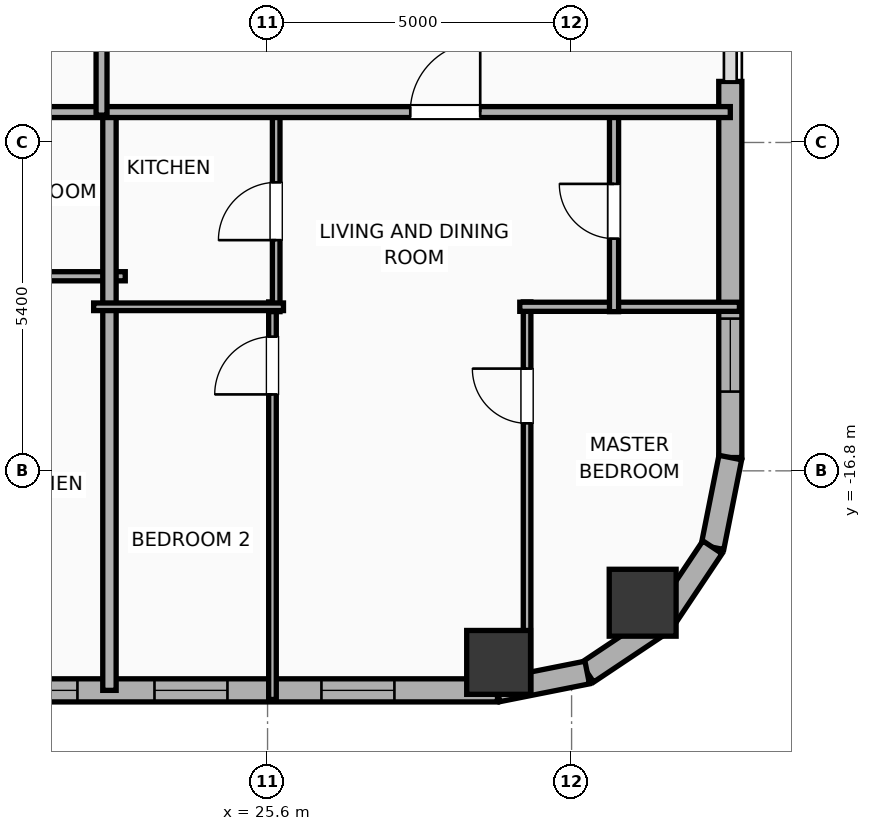
"""IFC4 building model, lengths in metres.
Left out: names, types, materials, properties, quantities, classifications, styles, units other than length and angle.
Written with IfcOpenShell. Run it as: python <this file> out.ifc"""

import sys

from ifc_helpers import new_model, si_unit, direction, frame, frame_2d, origin, origin_2d, place, context, subcontext, project, spatial, rectangle, hollow_rectangle, hollow_circle, extrude, element, fill, save


model = new_model("IFC4")
c1 = context("Model", 3, precision=1e-05, world=origin(), true_north=direction((0.0, 1.0)))
c2 = subcontext(c1, "Body", "Model", "MODEL_VIEW")
j1 = project(units=[si_unit("LENGTHUNIT", "METRE"), si_unit("PLANEANGLEUNIT", "RADIAN")], contexts=[c1])
p1 = place(None, origin())
s1 = spatial("IfcSite", under=j1, at=p1, CompositionType="ELEMENT")
p2 = place(p1, origin())
s2 = spatial("IfcBuilding", under=s1, at=p2, CompositionType="ELEMENT")
p3 = place(p2, frame((0.0, 0.0, 89.7)))
s3 = spatial("IfcBuildingStorey", under=s2, at=p3, CompositionType="ELEMENT", Elevation=89.7)
p4 = place(p3, frame((29.4, -19.95, 0.0), z_axis=(0.0, 0.0, 1.0), x_axis=(1.0, 0.0, 0.0)))
e1 = element("IfcColumn", 1, at=p4, inside=s3, PredefinedType="COLUMN", context=c2, shape_type="SweptSolid", body=[
    extrude(hollow_rectangle(XDim=1.05, YDim=1.05, WallThickness=0.036, at=origin_2d()), origin(), (0.0, 0.0, 1.0), 3.9),
])
p5 = place(p3, frame((31.769, -18.969, 0.0), z_axis=(0.0, 0.0, 1.0), x_axis=(1.0, 0.0, 0.0)))
e2 = element("IfcColumn", 2, at=p5, inside=s3, PredefinedType="COLUMN", context=c2, shape_type="SweptSolid", body=[
    extrude(hollow_circle(Radius=0.55, WallThickness=0.036, at=origin_2d()), origin(), (0.0, 0.0, 1.0), 3.9),
])
p6 = place(p3, frame((29.381, -20.41, 0.0), z_axis=(0.0, 0.0, 1.0), x_axis=(-1.0, 0.0, 0.0)))
e3 = element("IfcWall", 3, at=p6, inside=s3, PredefinedType="ELEMENTEDWALL", context=c2, shape_type="SweptSolid", body=[
    extrude(rectangle(XDim=54.763, YDim=0.38, at=frame_2d((27.381, 0.0))), origin(), (0.0, 0.0, 1.0), 2.54),
])
p7 = place(p6, frame((48.367, 0.0, 0.75)))
e4 = element("IfcOpeningElement", 4, at=p7, cuts=e3, PredefinedType="OPENING", context=c2, shape_type="SweptSolid", body=[
    extrude(rectangle(XDim=2.4, YDim=1.63, at=frame_2d((1.2, 0.815))), frame((0.0, 0.2, 0.0), z_axis=(0.0, -1.0, 0.0), x_axis=(1.0, 0.0, 0.0)), (0.0, 0.0, 1.0), 0.4),
])
p8 = place(p6, frame((52.081, 0.0, 0.75)))
e5 = element("IfcOpeningElement", 5, at=p8, cuts=e3, PredefinedType="OPENING", context=c2, shape_type="SweptSolid", body=[
    extrude(rectangle(XDim=1.2, YDim=1.63, at=frame_2d((0.6, 0.815))), frame((0.0, 0.2, 0.0), z_axis=(0.0, -1.0, 0.0), x_axis=(1.0, 0.0, 0.0)), (0.0, 0.0, 1.0), 0.4),
])
p9 = place(p6, frame((45.486, 0.0, 0.75)))
e6 = element("IfcOpeningElement", 6, at=p9, cuts=e3, PredefinedType="OPENING", context=c2, shape_type="SweptSolid", body=[
    extrude(rectangle(XDim=1.2, YDim=1.63, at=frame_2d((0.6, 0.815))), frame((0.0, 0.2, 0.0), z_axis=(0.0, -1.0, 0.0), x_axis=(1.0, 0.0, 0.0)), (0.0, 0.0, 1.0), 0.4),
])
p10 = place(p6, frame((40.531, 0.0, 0.75)))
e7 = element("IfcOpeningElement", 7, at=p10, cuts=e3, PredefinedType="OPENING", context=c2, shape_type="SweptSolid", body=[
    extrude(rectangle(XDim=1.2, YDim=1.63, at=frame_2d((0.6, 0.815))), frame((0.0, 0.2, 0.0), z_axis=(0.0, -1.0, 0.0), x_axis=(1.0, 0.0, 0.0)), (0.0, 0.0, 1.0), 0.4),
])
p11 = place(p6, frame((33.686, 0.0, 0.75)))
e8 = element("IfcOpeningElement", 8, at=p11, cuts=e3, PredefinedType="OPENING", context=c2, shape_type="SweptSolid", body=[
    extrude(rectangle(XDim=1.2, YDim=1.63, at=frame_2d((0.6, 0.815))), frame((0.0, 0.2, 0.0), z_axis=(0.0, -1.0, 0.0), x_axis=(1.0, 0.0, 0.0)), (0.0, 0.0, 1.0), 0.4),
])
p12 = place(p6, frame((35.976, 0.0, 0.75)))
e9 = element("IfcOpeningElement", 9, at=p12, cuts=e3, PredefinedType="OPENING", context=c2, shape_type="SweptSolid", body=[
    extrude(rectangle(XDim=1.2, YDim=1.63, at=frame_2d((0.6, 0.815))), frame((0.0, 0.2, 0.0), z_axis=(0.0, -1.0, 0.0), x_axis=(1.0, 0.0, 0.0)), (0.0, 0.0, 1.0), 0.4),
])
p13 = place(p6, frame((28.805, 0.0, 0.75)))
e10 = element("IfcOpeningElement", 10, at=p13, cuts=e3, PredefinedType="OPENING", context=c2, shape_type="SweptSolid", body=[
    extrude(rectangle(XDim=1.2, YDim=1.63, at=frame_2d((0.6, 0.815))), frame((0.0, 0.2, 0.0), z_axis=(0.0, -1.0, 0.0), x_axis=(1.0, 0.0, 0.0)), (0.0, 0.0, 1.0), 0.4),
])
p14 = place(p6, frame((25.555, 0.0, 0.75)))
e11 = element("IfcOpeningElement", 11, at=p14, cuts=e3, PredefinedType="OPENING", context=c2, shape_type="SweptSolid", body=[
    extrude(rectangle(XDim=1.2, YDim=1.63, at=frame_2d((0.6, 0.815))), frame((0.0, 0.2, 0.0), z_axis=(0.0, -1.0, 0.0), x_axis=(1.0, 0.0, 0.0)), (0.0, 0.0, 1.0), 0.4),
])
p15 = place(p6, frame((19.951, 0.0, 0.75)))
e12 = element("IfcOpeningElement", 12, at=p15, cuts=e3, PredefinedType="OPENING", context=c2, shape_type="SweptSolid", body=[
    extrude(rectangle(XDim=1.2, YDim=1.63, at=frame_2d((0.6, 0.815))), frame((0.0, 0.2, 0.0), z_axis=(0.0, -1.0, 0.0), x_axis=(1.0, 0.0, 0.0)), (0.0, 0.0, 1.0), 0.4),
])
p16 = place(p6, frame((16.008, 0.0, 0.75)))
e13 = element("IfcOpeningElement", 13, at=p16, cuts=e3, PredefinedType="OPENING", context=c2, shape_type="SweptSolid", body=[
    extrude(rectangle(XDim=1.2, YDim=1.63, at=frame_2d((0.6, 0.815))), frame((0.0, 0.2, 0.0), z_axis=(0.0, -1.0, 0.0), x_axis=(1.0, 0.0, 0.0)), (0.0, 0.0, 1.0), 0.4),
])
p17 = place(p6, frame((13.008, 0.0, 0.75)))
e14 = element("IfcOpeningElement", 14, at=p17, cuts=e3, PredefinedType="OPENING", context=c2, shape_type="SweptSolid", body=[
    extrude(rectangle(XDim=1.2, YDim=1.63, at=frame_2d((0.6, 0.815))), frame((0.0, 0.2, 0.0), z_axis=(0.0, -1.0, 0.0), x_axis=(1.0, 0.0, 0.0)), (0.0, 0.0, 1.0), 0.4),
])
p18 = place(p6, frame((8.948, 0.0, 0.75)))
e15 = element("IfcOpeningElement", 15, at=p18, cuts=e3, PredefinedType="OPENING", context=c2, shape_type="SweptSolid", body=[
    extrude(rectangle(XDim=1.2, YDim=1.63, at=frame_2d((0.6, 0.815))), frame((0.0, 0.2, 0.0), z_axis=(0.0, -1.0, 0.0), x_axis=(1.0, 0.0, 0.0)), (0.0, 0.0, 1.0), 0.4),
])
p19 = place(p6, frame((6.908, 0.0, 0.75)))
e16 = element("IfcOpeningElement", 16, at=p19, cuts=e3, PredefinedType="OPENING", context=c2, shape_type="SweptSolid", body=[
    extrude(rectangle(XDim=1.2, YDim=1.63, at=frame_2d((0.6, 0.815))), frame((0.0, 0.2, 0.0), z_axis=(0.0, -1.0, 0.0), x_axis=(1.0, 0.0, 0.0)), (0.0, 0.0, 1.0), 0.4),
])
p20 = place(p6, frame((1.695, 0.0, 0.75)))
e17 = element("IfcOpeningElement", 17, at=p20, cuts=e3, PredefinedType="OPENING", context=c2, shape_type="SweptSolid", body=[
    extrude(rectangle(XDim=1.2, YDim=1.63, at=frame_2d((0.6, 0.815))), frame((0.0, 0.2, 0.0), z_axis=(0.0, -1.0, 0.0), x_axis=(1.0, 0.0, 0.0)), (0.0, 0.0, 1.0), 0.4),
])
p21 = place(p6, frame((4.441, 0.0, 0.75)))
e18 = element("IfcOpeningElement", 18, at=p21, cuts=e3, PredefinedType="OPENING", context=c2, shape_type="SweptSolid", body=[
    extrude(rectangle(XDim=1.2, YDim=1.63, at=frame_2d((0.6, 0.815))), frame((0.0, 0.2, 0.0), z_axis=(0.0, -1.0, 0.0), x_axis=(1.0, 0.0, 0.0)), (0.0, 0.0, 1.0), 0.4),
])
p22 = place(p3, frame((33.21, -10.396, 0.0), z_axis=(0.0, 0.0, 1.0), x_axis=(0.0, -1.0, 0.0)))
e19 = element("IfcWall", 19, at=p22, inside=s3, PredefinedType="ELEMENTEDWALL", context=c2, shape_type="SweptSolid", body=[
    extrude(rectangle(XDim=6.185, YDim=0.38, at=frame_2d((3.093, 0.0))), origin(), (0.0, 0.0, 1.0), 2.54),
])
p23 = place(p22, frame((3.901, 0.0, 0.75)))
e20 = element("IfcOpeningElement", 20, at=p23, cuts=e19, PredefinedType="OPENING", context=c2, shape_type="SweptSolid", body=[
    extrude(rectangle(XDim=1.2, YDim=1.63, at=frame_2d((0.6, 0.815))), frame((0.0, 0.2, 0.0), z_axis=(0.0, -1.0, 0.0), x_axis=(1.0, 0.0, 0.0)), (0.0, 0.0, 1.0), 0.4),
])
p24 = place(p3, frame((33.21, -16.581, 0.0), z_axis=(0.0, 0.0, 1.0), x_axis=(-0.195086038585, -0.980786132421, 0.0)))
e21 = element("IfcWall", 21, at=p24, inside=s3, PredefinedType="ELEMENTEDWALL", context=c2, shape_type="SweptSolid", body=[
    extrude(rectangle(XDim=1.504, YDim=0.38, at=frame_2d((0.752, 0.0))), origin(), (0.0, 0.0, 1.0), 3.65),
])
p25 = place(p3, frame((32.917, -18.057, 0.0), z_axis=(0.0, 0.0, 1.0), x_axis=(-0.555610286119, -0.831442848281, 0.0)))
e22 = element("IfcWall", 22, at=p25, inside=s3, PredefinedType="ELEMENTEDWALL", context=c2, shape_type="SweptSolid", body=[
    extrude(rectangle(XDim=1.485, YDim=0.38, at=frame_2d((0.743, 0.0))), origin(), (0.0, 0.0, 1.0), 3.65),
])
p26 = place(p3, frame((32.091, -19.292, 0.0), z_axis=(0.0, 0.0, 1.0), x_axis=(-0.831468045563, -0.555572577804, 0.0)))
e23 = element("IfcWall", 23, at=p26, inside=s3, PredefinedType="ELEMENTEDWALL", context=c2, shape_type="SweptSolid", body=[
    extrude(rectangle(XDim=1.485, YDim=0.38, at=frame_2d((0.742, 0.0))), origin(), (0.0, 0.0, 1.0), 2.54),
])
p27 = place(p3, frame((30.857, -20.116, 0.0), z_axis=(0.0, 0.0, 1.0), x_axis=(-0.980786132421, -0.195086038585, 0.0)))
e24 = element("IfcWall", 24, at=p27, inside=s3, PredefinedType="ELEMENTEDWALL", context=c2, shape_type="SweptSolid", body=[
    extrude(rectangle(XDim=1.504, YDim=0.38, at=frame_2d((0.752, 0.0))), origin(), (0.0, 0.0, 1.0), 2.54),
])
p28 = place(p3, frame((20.667, -13.6, 0.0), z_axis=(0.0, 0.0, 1.0), x_axis=(1.0, 0.0, 0.0)))
e25 = element("IfcWall", 25, at=p28, inside=s3, PredefinedType="PLUMBINGWALL", context=c2, shape_type="SweptSolid", body=[
    extrude(rectangle(XDim=2.593, YDim=0.15, at=frame_2d((1.296, 0.0))), origin(), (0.0, 0.0, 1.0), 3.65),
])
p29 = place(p3, frame((23.0, -20.41, 0.0), z_axis=(0.0, 0.0, 1.0), x_axis=(0.0, 1.0, 0.0)))
e26 = element("IfcWall", 26, at=p29, inside=s3, PredefinedType="PARTITIONING", context=c2, shape_type="SweptSolid", body=[
    extrude(rectangle(XDim=9.59, YDim=0.22, at=frame_2d((4.795, 0.0))), origin(), (0.0, 0.0, 1.0), 3.65),
])
p30 = place(p3, frame((25.681, -20.56, 0.0), z_axis=(0.0, 0.0, 1.0), x_axis=(0.0, 1.0, 0.0)))
e27 = element("IfcWall", 27, at=p30, inside=s3, PredefinedType="PARTITIONING", context=c2, shape_type="SweptSolid", body=[
    extrude(rectangle(XDim=6.538, YDim=0.125, at=frame_2d((3.269, 0.0))), origin(), (0.0, 0.0, 1.0), 3.65),
])
p31 = place(p30, frame((5.017, 0.0, 0.0)))
e28 = element("IfcOpeningElement", 28, at=p31, cuts=e27, PredefinedType="OPENING", context=c2, shape_type="SweptSolid", body=[
    extrude(rectangle(XDim=0.95, YDim=2.05, at=frame_2d((0.475, 1.025))), frame((0.0, 0.073, 0.0), z_axis=(0.0, -1.0, 0.0), x_axis=(1.0, 0.0, 0.0)), (0.0, 0.0, 1.0), 0.145),
])
p32 = place(p3, frame((29.868, -20.466, 0.0), z_axis=(0.0, 0.0, 1.0), x_axis=(0.0, 1.0, 0.0)))
e29 = element("IfcWall", 29, at=p32, inside=s3, PredefinedType="PARTITIONING", context=c2, shape_type="SweptSolid", body=[
    extrude(rectangle(XDim=6.444, YDim=0.125, at=frame_2d((3.222, 0.0))), origin(), (0.0, 0.0, 1.0), 3.65),
])
p33 = place(p32, frame((4.448, 0.0, 0.0)))
e30 = element("IfcOpeningElement", 30, at=p33, cuts=e29, PredefinedType="OPENING", context=c2, shape_type="SweptSolid", body=[
    extrude(rectangle(XDim=0.9, YDim=2.05, at=frame_2d((0.45, 1.025))), frame((0.0, 0.073, 0.0), z_axis=(0.0, -1.0, 0.0), x_axis=(1.0, 0.0, 0.0)), (0.0, 0.0, 1.0), 0.145),
])
p34 = place(p3, frame((29.748, -14.102, 0.0), z_axis=(0.0, 0.0, 1.0), x_axis=(1.0, 0.0, 0.0)))
e31 = element("IfcWall", 31, at=p34, inside=s3, PredefinedType="PLUMBINGWALL", context=c2, shape_type="SweptSolid", body=[
    extrude(rectangle(XDim=3.612, YDim=0.15, at=frame_2d((1.806, 0.0))), origin(), (0.0, 0.0, 1.0), 3.65),
])
p35 = place(p3, frame((25.742, -14.182, 0.0), z_axis=(0.0, 0.0, 1.0), x_axis=(0.0, 1.0, 0.0)))
e32 = element("IfcWall", 32, at=p35, inside=s3, PredefinedType="PARTITIONING", context=c2, shape_type="SweptSolid", body=[
    extrude(rectangle(XDim=3.302, YDim=0.125, at=frame_2d((1.651, 0.0))), origin(), (0.0, 0.0, 1.0), 3.65),
])
p36 = place(p35, frame((1.176, 0.0, 0.0)))
e33 = element("IfcOpeningElement", 33, at=p36, cuts=e32, PredefinedType="OPENING", context=c2, shape_type="SweptSolid", body=[
    extrude(rectangle(XDim=0.95, YDim=2.05, at=frame_2d((0.475, 1.025))), frame((0.0, 0.073, 0.0), z_axis=(0.0, -1.0, 0.0), x_axis=(1.0, 0.0, 0.0)), (0.0, 0.0, 1.0), 0.145),
])
p37 = place(p3, frame((22.74, -14.102, 0.0), z_axis=(0.0, 0.0, 1.0), x_axis=(1.0, 0.0, 0.0)))
e34 = element("IfcWall", 34, at=p37, inside=s3, PredefinedType="PARTITIONING", context=c2, shape_type="SweptSolid", body=[
    extrude(rectangle(XDim=3.122, YDim=0.125, at=frame_2d((1.561, 0.0))), origin(), (0.0, 0.0, 1.0), 3.65),
])
p38 = place(p3, frame((31.298, -14.182, 0.0), z_axis=(0.0, 0.0, 1.0), x_axis=(0.0, 1.0, 0.0)))
e35 = element("IfcWall", 35, at=p38, inside=s3, PredefinedType="PLUMBINGWALL", context=c2, shape_type="SweptSolid", body=[
    extrude(rectangle(XDim=3.302, YDim=0.15, at=frame_2d((1.651, 0.0))), origin(), (0.0, 0.0, 1.0), 3.65),
])
p39 = place(p38, frame((1.201, 0.0, 0.0)))
e36 = element("IfcOpeningElement", 36, at=p39, cuts=e35, PredefinedType="OPENING", context=c2, shape_type="SweptSolid", body=[
    extrude(rectangle(XDim=0.9, YDim=2.05, at=frame_2d((0.45, 1.025))), frame((0.0, 0.085, 0.0), z_axis=(0.0, -1.0, 0.0), x_axis=(1.0, 0.0, 0.0)), (0.0, 0.0, 1.0), 0.17),
])
p40 = place(p3, frame((-29.21, -10.9, 0.0), z_axis=(0.0, 0.0, 1.0), x_axis=(1.0, 0.0, 0.0)))
e37 = element("IfcWall", 37, at=p40, inside=s3, PredefinedType="PARTITIONING", context=c2, shape_type="SweptSolid", body=[
    extrude(rectangle(XDim=62.42, YDim=0.18, at=frame_2d((31.21, 0.0))), origin(), (0.0, 0.0, 1.0), 3.65),
])
p41 = place(p40, frame((3.108, 0.0, 0.0)))
e38 = element("IfcOpeningElement", 38, at=p41, cuts=e37, PredefinedType="OPENING", context=c2, shape_type="SweptSolid", body=[
    extrude(rectangle(XDim=1.15, YDim=2.05, at=frame_2d((0.575, 1.025))), frame((0.0, 0.1, 0.0), z_axis=(0.0, -1.0, 0.0), x_axis=(1.0, 0.0, 0.0)), (0.0, 0.0, 1.0), 0.2),
])
p42 = place(p40, frame((10.242, 0.0, 0.0)))
e39 = element("IfcOpeningElement", 39, at=p42, cuts=e37, PredefinedType="OPENING", context=c2, shape_type="SweptSolid", body=[
    extrude(rectangle(XDim=1.15, YDim=2.05, at=frame_2d((0.575, 1.025))), frame((0.0, 0.1, 0.0), z_axis=(0.0, -1.0, 0.0), x_axis=(1.0, 0.0, 0.0)), (0.0, 0.0, 1.0), 0.2),
])
p43 = place(p40, frame((17.14, 0.0, 0.0)))
e40 = element("IfcOpeningElement", 40, at=p43, cuts=e37, PredefinedType="OPENING", context=c2, shape_type="SweptSolid", body=[
    extrude(rectangle(XDim=0.9, YDim=2.05, at=frame_2d((0.45, 1.025))), frame((0.0, 0.1, 0.0), z_axis=(0.0, -1.0, 0.0), x_axis=(1.0, 0.0, 0.0)), (0.0, 0.0, 1.0), 0.2),
])
p44 = place(p40, frame((24.661, 0.0, 0.0)))
e41 = element("IfcOpeningElement", 41, at=p44, cuts=e37, PredefinedType="OPENING", context=c2, shape_type="SweptSolid", body=[
    extrude(rectangle(XDim=1.15, YDim=2.05, at=frame_2d((0.575, 1.025))), frame((0.0, 0.1, 0.0), z_axis=(0.0, -1.0, 0.0), x_axis=(1.0, 0.0, 0.0)), (0.0, 0.0, 1.0), 0.2),
])
p45 = place(p40, frame((28.644, 0.0, 0.0)))
e42 = element("IfcOpeningElement", 42, at=p45, cuts=e37, PredefinedType="OPENING", context=c2, shape_type="SweptSolid", body=[
    extrude(rectangle(XDim=1.15, YDim=2.05, at=frame_2d((0.575, 1.025))), frame((0.0, 0.1, 0.0), z_axis=(0.0, -1.0, 0.0), x_axis=(1.0, 0.0, 0.0)), (0.0, 0.0, 1.0), 0.2),
])
p46 = place(p40, frame((36.64, 0.0, 0.0)))
e43 = element("IfcOpeningElement", 43, at=p46, cuts=e37, PredefinedType="OPENING", context=c2, shape_type="SweptSolid", body=[
    extrude(rectangle(XDim=0.9, YDim=2.05, at=frame_2d((0.45, 1.025))), frame((0.0, 0.1, 0.0), z_axis=(0.0, -1.0, 0.0), x_axis=(1.0, 0.0, 0.0)), (0.0, 0.0, 1.0), 0.2),
])
p47 = place(p40, frame((41.44, 0.0, 0.0)))
e44 = element("IfcOpeningElement", 44, at=p47, cuts=e37, PredefinedType="OPENING", context=c2, shape_type="SweptSolid", body=[
    extrude(rectangle(XDim=1.15, YDim=2.05, at=frame_2d((0.575, 1.025))), frame((0.0, 0.1, 0.0), z_axis=(0.0, -1.0, 0.0), x_axis=(1.0, 0.0, 0.0)), (0.0, 0.0, 1.0), 0.2),
])
p48 = place(p40, frame((47.538, 0.0, 0.0)))
e45 = element("IfcOpeningElement", 45, at=p48, cuts=e37, PredefinedType="OPENING", context=c2, shape_type="SweptSolid", body=[
    extrude(rectangle(XDim=1.15, YDim=2.05, at=frame_2d((0.575, 1.025))), frame((0.0, 0.1, 0.0), z_axis=(0.0, -1.0, 0.0), x_axis=(1.0, 0.0, 0.0)), (0.0, 0.0, 1.0), 0.2),
])
p49 = place(p40, frame((57.157, 0.0, 0.0)))
e46 = element("IfcOpeningElement", 46, at=p49, cuts=e37, PredefinedType="OPENING", context=c2, shape_type="SweptSolid", body=[
    extrude(rectangle(XDim=1.15, YDim=2.05, at=frame_2d((0.575, 1.025))), frame((0.0, 0.1, 0.0), z_axis=(0.0, -1.0, 0.0), x_axis=(1.0, 0.0, 0.0)), (0.0, 0.0, 1.0), 0.2),
])
p50 = place(p3, frame((22.87, -10.95, 0.0), z_axis=(0.0, 0.0, 1.0), x_axis=(0.0, 1.0, 0.0)))
e47 = element("IfcWall", 47, at=p50, inside=s3, PredefinedType="PARTITIONING", context=c2, shape_type="SweptSolid", body=[
    extrude(rectangle(XDim=21.9, YDim=0.18, at=frame_2d((10.95, 0.0))), origin(), (0.0, 0.0, 1.0), 3.65),
])
p51 = place(p50, frame((19.015, 0.0, 0.0)))
e48 = element("IfcOpeningElement", 48, at=p51, cuts=e47, PredefinedType="OPENING", context=c2, shape_type="SweptSolid", body=[
    extrude(rectangle(XDim=0.95, YDim=2.05, at=frame_2d((0.475, 1.025))), frame((0.0, 0.1, 0.0), z_axis=(0.0, -1.0, 0.0), x_axis=(1.0, 0.0, 0.0)), (0.0, 0.0, 1.0), 0.2),
])
p52 = place(p19, origin())
e49 = element("IfcWindow", 49, at=p52, inside=s3, PartitioningType="SINGLE_PANEL", PredefinedType="WINDOW", context=c2, shape_type="SweptSolid", body=[
    extrude(rectangle(XDim=1.2, YDim=1.63, at=frame_2d((0.6, 0.815))), frame((0.0, 0.03, 0.0), z_axis=(0.0, -1.0, 0.0), x_axis=(1.0, 0.0, 0.0)), (0.0, 0.0, 1.0), 0.06),
])
fill(e16, e49)
p53 = place(p20, origin())
e50 = element("IfcWindow", 50, at=p53, inside=s3, PartitioningType="SINGLE_PANEL", PredefinedType="WINDOW", context=c2, shape_type="SweptSolid", body=[
    extrude(rectangle(XDim=1.2, YDim=1.63, at=frame_2d((0.6, 0.815))), frame((0.0, 0.03, 0.0), z_axis=(0.0, -1.0, 0.0), x_axis=(1.0, 0.0, 0.0)), (0.0, 0.0, 1.0), 0.06),
])
fill(e17, e50)
p54 = place(p21, origin())
e51 = element("IfcWindow", 51, at=p54, inside=s3, PartitioningType="SINGLE_PANEL", PredefinedType="WINDOW", context=c2, shape_type="SweptSolid", body=[
    extrude(rectangle(XDim=1.2, YDim=1.63, at=frame_2d((0.6, 0.815))), frame((0.0, 0.03, 0.0), z_axis=(0.0, -1.0, 0.0), x_axis=(1.0, 0.0, 0.0)), (0.0, 0.0, 1.0), 0.06),
])
fill(e18, e51)
p55 = place(p23, origin())
e52 = element("IfcWindow", 52, at=p55, inside=s3, PartitioningType="SINGLE_PANEL", PredefinedType="WINDOW", context=c2, shape_type="SweptSolid", body=[
    extrude(rectangle(XDim=1.2, YDim=1.63, at=frame_2d((0.6, 0.815))), frame((0.0, 0.03, 0.0), z_axis=(0.0, -1.0, 0.0), x_axis=(1.0, 0.0, 0.0)), (0.0, 0.0, 1.0), 0.06),
])
fill(e20, e52)
p56 = place(p31, origin())
e53 = element("IfcDoor", 53, at=p56, inside=s3, OperationType="SINGLE_SWING_LEFT", PredefinedType="DOOR", context=c2, shape_type="SweptSolid", body=[
    extrude(rectangle(XDim=0.95, YDim=2.05, at=frame_2d((0.475, 1.025))), frame((0.0, 0.025, 0.0), z_axis=(0.0, -1.0, 0.0), x_axis=(1.0, 0.0, 0.0)), (0.0, 0.0, 1.0), 0.05),
])
fill(e28, e53)
p57 = place(p33, origin())
e54 = element("IfcDoor", 54, at=p57, inside=s3, OperationType="SINGLE_SWING_RIGHT", PredefinedType="DOOR", context=c2, shape_type="SweptSolid", body=[
    extrude(rectangle(XDim=0.9, YDim=2.05, at=frame_2d((0.45, 1.025))), frame((0.0, 0.025, 0.0), z_axis=(0.0, -1.0, 0.0), x_axis=(1.0, 0.0, 0.0)), (0.0, 0.0, 1.0), 0.05),
])
fill(e30, e54)
p58 = place(p36, origin())
e55 = element("IfcDoor", 55, at=p58, inside=s3, OperationType="SINGLE_SWING_LEFT", PredefinedType="DOOR", context=c2, shape_type="SweptSolid", body=[
    extrude(rectangle(XDim=0.95, YDim=2.05, at=frame_2d((0.475, 1.025))), frame((0.0, 0.025, 0.0), z_axis=(0.0, -1.0, 0.0), x_axis=(1.0, 0.0, 0.0)), (0.0, 0.0, 1.0), 0.05),
])
fill(e33, e55)
p59 = place(p39, origin())
e56 = element("IfcDoor", 56, at=p59, inside=s3, OperationType="SINGLE_SWING_RIGHT", PredefinedType="DOOR", context=c2, shape_type="SweptSolid", body=[
    extrude(rectangle(XDim=0.9, YDim=2.05, at=frame_2d((0.45, 1.025))), frame((0.0, 0.025, 0.0), z_axis=(0.0, -1.0, 0.0), x_axis=(1.0, 0.0, 0.0)), (0.0, 0.0, 1.0), 0.05),
])
fill(e36, e56)
p60 = place(p49, origin())
e57 = element("IfcDoor", 57, at=p60, inside=s3, OperationType="SINGLE_SWING_RIGHT", PredefinedType="DOOR", context=c2, shape_type="SweptSolid", body=[
    extrude(rectangle(XDim=1.15, YDim=2.05, at=frame_2d((0.575, 1.025))), frame((0.0, 0.025, 0.0), z_axis=(0.0, -1.0, 0.0), x_axis=(1.0, 0.0, 0.0)), (0.0, 0.0, 1.0), 0.05),
])
fill(e46, e57)
save(model, sys.argv[1])
